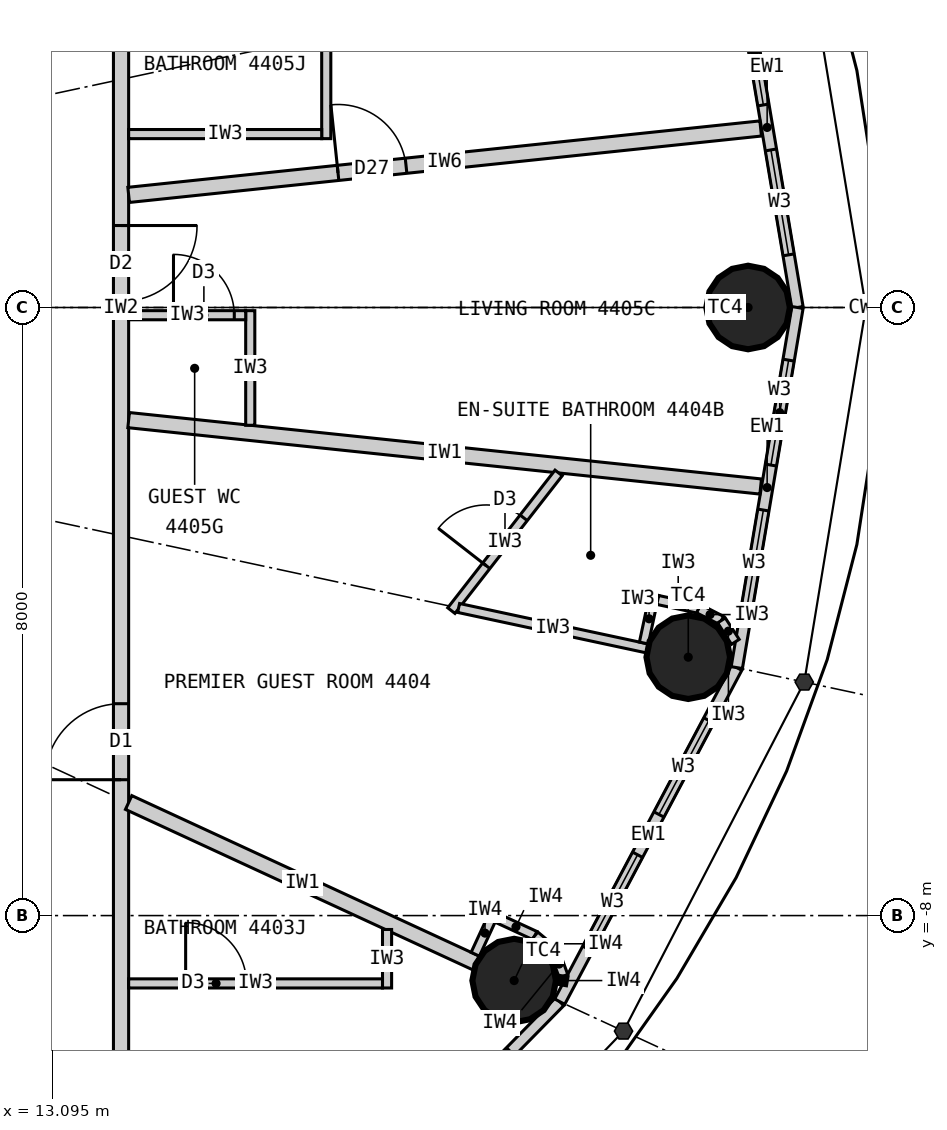
"""IFC4 building model, lengths in metres.
Left out: names, types, materials, properties, quantities, classifications, styles, units other than length and angle.
Written with IfcOpenShell. Run it as: python <this file> out.ifc"""

import sys

from ifc_helpers import new_model, si_unit, direction, frame, frame_2d, origin, origin_2d, place, context, subcontext, project, spatial, rectangle, circle, extrude, element, fill, save


model = new_model("IFC4")
c1 = context("Model", 3, precision=1e-05, world=origin(), true_north=direction((0.0, 1.0)))
c2 = subcontext(c1, "Body", "Model", "MODEL_VIEW")
j1 = project(units=[si_unit("LENGTHUNIT", "METRE"), si_unit("PLANEANGLEUNIT", "RADIAN")], contexts=[c1])
p1 = place(None, origin())
s1 = spatial("IfcSite", under=j1, at=p1, CompositionType="ELEMENT")
p2 = place(p1, origin())
s2 = spatial("IfcBuilding", under=s1, at=p2, CompositionType="ELEMENT")
p3 = place(p2, frame((0.0, 0.0, 166.5)))
s3 = spatial("IfcBuildingStorey", under=s2, at=p3, CompositionType="ELEMENT", Elevation=166.5)
for number, where, z_axis, x_axis in (
    (1, (22.25, 0.0, 0.0), (0.0, 0.0, 1.0), (1.0, 0.0, 0.0)),
    (2, (19.172, -8.855, 0.0), (0.0, 0.0, 1.0), (1.0, 0.0, 0.0)),
    (3, (21.463, -4.601, 0.0), (0.0, 0.0, 1.0), (1.0, 0.0, 0.0)),
):
    element("IfcColumn", number, at=place(p3, frame(where, z_axis=z_axis, x_axis=x_axis)), inside=s3, PredefinedType="COLUMN", context=c2, shape_type="SweptSolid", body=[
        extrude(circle(Radius=0.55, at=origin_2d()), origin(), (0.0, 0.0, 1.0), 3.3),
    ])
p4 = place(p3, frame((22.9, 0.0, 0.0), z_axis=(0.0, 0.0, 1.0), x_axis=(-0.166162111254, 0.986098449843, 0.0)))
e4 = element("IfcWall", 4, at=p4, inside=s3, PredefinedType="ELEMENTEDWALL", context=c2, shape_type="SweptSolid", body=[
    extrude(rectangle(XDim=4.805, YDim=0.15, at=frame_2d((2.402, 0.0))), origin(), (0.0, 0.0, 1.0), 3.12),
])
p5 = place(p4, frame((0.702, 0.0, 0.9)))
e5 = element("IfcOpeningElement", 5, at=p5, cuts=e4, PredefinedType="OPENING", context=c2, shape_type="SweptSolid", body=[
    extrude(rectangle(XDim=1.4, YDim=1.9, at=frame_2d((0.7, 0.95))), frame((0.0, 0.085, 0.0), z_axis=(0.0, -1.0, 0.0), x_axis=(1.0, 0.0, 0.0)), (0.0, 0.0, 1.0), 0.17),
])
p6 = place(p4, frame((2.702, 0.0, 0.9)))
e6 = element("IfcOpeningElement", 6, at=p6, cuts=e4, PredefinedType="OPENING", context=c2, shape_type="SweptSolid", body=[
    extrude(rectangle(XDim=1.4, YDim=1.9, at=frame_2d((0.7, 0.95))), frame((0.0, 0.085, 0.0), z_axis=(0.0, -1.0, 0.0), x_axis=(1.0, 0.0, 0.0)), (0.0, 0.0, 1.0), 0.17),
])
p7 = place(p3, frame((16.095, -12.876, 0.0), z_axis=(0.0, 0.0, 1.0), x_axis=(0.700727467776, 0.71342905457, 0.0)))
e7 = element("IfcWall", 7, at=p7, inside=s3, PredefinedType="ELEMENTEDWALL", context=c2, shape_type="SweptSolid", body=[
    extrude(rectangle(XDim=5.247, YDim=0.15, at=frame_2d((2.624, 0.0))), origin(), (0.0, 0.0, 1.0), 3.12),
])
p8 = place(p7, frame((0.924, 0.0, 0.9)))
e8 = element("IfcOpeningElement", 8, at=p8, cuts=e7, PredefinedType="OPENING", context=c2, shape_type="SweptSolid", body=[
    extrude(rectangle(XDim=1.4, YDim=1.9, at=frame_2d((0.7, 0.95))), frame((0.0, 0.085, 0.0), z_axis=(0.0, -1.0, 0.0), x_axis=(1.0, 0.0, 0.0)), (0.0, 0.0, 1.0), 0.17),
])
p9 = place(p7, frame((2.924, 0.0, 0.9)))
e9 = element("IfcOpeningElement", 9, at=p9, cuts=e7, PredefinedType="OPENING", context=c2, shape_type="SweptSolid", body=[
    extrude(rectangle(XDim=1.4, YDim=1.9, at=frame_2d((0.7, 0.95))), frame((0.0, 0.085, 0.0), z_axis=(0.0, -1.0, 0.0), x_axis=(1.0, 0.0, 0.0)), (0.0, 0.0, 1.0), 0.17),
])
p10 = place(p3, frame((19.772, -9.132, 0.0), z_axis=(0.0, 0.0, 1.0), x_axis=(0.468428906714, 0.883501193748, 0.0)))
e10 = element("IfcWall", 10, at=p10, inside=s3, PredefinedType="ELEMENTEDWALL", context=c2, shape_type="SweptSolid", body=[
    extrude(rectangle(XDim=4.974, YDim=0.15, at=frame_2d((2.487, 0.0))), origin(), (0.0, 0.0, 1.0), 3.12),
])
p11 = place(p10, frame((0.787, 0.0, 0.9)))
e11 = element("IfcOpeningElement", 11, at=p11, cuts=e10, PredefinedType="OPENING", context=c2, shape_type="SweptSolid", body=[
    extrude(rectangle(XDim=1.4, YDim=1.9, at=frame_2d((0.7, 0.95))), frame((0.0, 0.085, 0.0), z_axis=(0.0, -1.0, 0.0), x_axis=(1.0, 0.0, 0.0)), (0.0, 0.0, 1.0), 0.17),
])
p12 = place(p10, frame((2.787, 0.0, 0.9)))
e12 = element("IfcOpeningElement", 12, at=p12, cuts=e10, PredefinedType="OPENING", context=c2, shape_type="SweptSolid", body=[
    extrude(rectangle(XDim=1.4, YDim=1.9, at=frame_2d((0.7, 0.95))), frame((0.0, 0.085, 0.0), z_axis=(0.0, -1.0, 0.0), x_axis=(1.0, 0.0, 0.0)), (0.0, 0.0, 1.0), 0.17),
])
p13 = place(p3, frame((22.102, -4.738, 0.0), z_axis=(0.0, 0.0, 1.0), x_axis=(0.166162111254, 0.986098449843, 0.0)))
e13 = element("IfcWall", 13, at=p13, inside=s3, PredefinedType="ELEMENTEDWALL", context=c2, shape_type="SweptSolid", body=[
    extrude(rectangle(XDim=4.805, YDim=0.15, at=frame_2d((2.402, 0.0))), origin(), (0.0, 0.0, 1.0), 3.12),
])
p14 = place(p13, frame((0.702, 0.0, 0.9)))
e14 = element("IfcOpeningElement", 14, at=p14, cuts=e13, PredefinedType="OPENING", context=c2, shape_type="SweptSolid", body=[
    extrude(rectangle(XDim=1.4, YDim=1.9, at=frame_2d((0.7, 0.95))), frame((0.0, 0.085, 0.0), z_axis=(0.0, -1.0, 0.0), x_axis=(1.0, 0.0, 0.0)), (0.0, 0.0, 1.0), 0.17),
])
p15 = place(p13, frame((2.702, 0.0, 0.9)))
e15 = element("IfcOpeningElement", 15, at=p15, cuts=e13, PredefinedType="OPENING", context=c2, shape_type="SweptSolid", body=[
    extrude(rectangle(XDim=1.4, YDim=1.9, at=frame_2d((0.7, 0.95))), frame((0.0, 0.085, 0.0), z_axis=(0.0, -1.0, 0.0), x_axis=(1.0, 0.0, 0.0)), (0.0, 0.0, 1.0), 0.17),
])
p16 = place(p3, frame((14.0, -9.9, 0.0), z_axis=(0.0, 0.0, 1.0), x_axis=(0.0, 1.0, 0.0)))
e16 = element("IfcWall", 16, at=p16, inside=s3, PredefinedType="PARTITIONING", context=c2, shape_type="SweptSolid", body=[
    extrude(rectangle(XDim=19.8, YDim=0.2, at=frame_2d((9.9, 0.0))), origin(), (0.0, 0.0, 1.0), 3.12),
])
p17 = place(p16, frame((3.688, 0.0, 0.0)))
e17 = element("IfcOpeningElement", 17, at=p17, cuts=e16, PredefinedType="OPENING", context=c2, shape_type="SweptSolid", body=[
    extrude(rectangle(XDim=1.0, YDim=2.2, at=frame_2d((0.5, 1.1))), frame((0.0, 0.11, 0.0), z_axis=(0.0, -1.0, 0.0), x_axis=(1.0, 0.0, 0.0)), (0.0, 0.0, 1.0), 0.22),
])
p18 = place(p16, frame((9.979, 0.0, 0.0)))
e18 = element("IfcOpeningElement", 18, at=p18, cuts=e16, PredefinedType="OPENING", context=c2, shape_type="SweptSolid", body=[
    extrude(rectangle(XDim=1.0, YDim=2.2, at=frame_2d((0.5, 1.1))), frame((0.0, 0.11, 0.0), z_axis=(0.0, -1.0, 0.0), x_axis=(1.0, 0.0, 0.0)), (0.0, 0.0, 1.0), 0.22),
])
p19 = place(p16, frame((17.122, 0.0, 0.0)))
e19 = element("IfcOpeningElement", 19, at=p19, cuts=e16, PredefinedType="OPENING", context=c2, shape_type="SweptSolid", body=[
    extrude(rectangle(XDim=1.0, YDim=2.2, at=frame_2d((0.5, 1.1))), frame((0.0, 0.11, 0.0), z_axis=(0.0, -1.0, 0.0), x_axis=(1.0, 0.0, 0.0)), (0.0, 0.0, 1.0), 0.22),
])
p20 = place(p3, frame((14.1, 1.481, 0.0), z_axis=(0.0, 0.0, 1.0), x_axis=(0.994524794819, 0.104500873159, 0.0)))
e20 = element("IfcWall", 20, at=p20, inside=s3, PredefinedType="PARTITIONING", context=c2, shape_type="SweptSolid", body=[
    extrude(rectangle(XDim=8.362, YDim=0.2, at=frame_2d((4.181, 0.0))), origin(), (0.0, 0.0, 1.0), 2.47),
])
p21 = place(p20, frame((2.77, 0.0, 0.0)))
e21 = element("IfcOpeningElement", 21, at=p21, cuts=e20, PredefinedType="OPENING", context=c2, shape_type="SweptSolid", body=[
    extrude(rectangle(XDim=0.9, YDim=2.1, at=frame_2d((0.45, 1.05))), frame((0.0, 0.11, 0.0), z_axis=(0.0, -1.0, 0.0), x_axis=(1.0, 0.0, 0.0)), (0.0, 0.0, 1.0), 0.22),
])
p22 = place(p3, frame((14.1, -6.512, 0.0), z_axis=(0.0, 0.0, 1.0), x_axis=(0.907823150669, -0.419353224751, 0.0)))
e22 = element("IfcWall", 22, at=p22, inside=s3, PredefinedType="PARTITIONING", context=c2, shape_type="SweptSolid", body=[
    extrude(rectangle(XDim=5.037, YDim=0.2, at=frame_2d((2.519, 0.0))), origin(), (0.0, 0.0, 1.0), 2.32),
])
p23 = place(p3, frame((14.1, -1.481, 0.0), z_axis=(0.0, 0.0, 1.0), x_axis=(0.994524794819, -0.104500873159, 0.0)))
e23 = element("IfcWall", 23, at=p23, inside=s3, PredefinedType="PARTITIONING", context=c2, shape_type="SweptSolid", body=[
    extrude(rectangle(XDim=8.362, YDim=0.2, at=frame_2d((4.181, 0.0))), origin(), (0.0, 0.0, 1.0), 2.47),
])
p24 = place(p3, frame((17.5, -8.183, 0.0), z_axis=(0.0, 0.0, 1.0), x_axis=(0.0, -1.0, 0.0)))
e24 = element("IfcWall", 24, at=p24, inside=s3, PredefinedType="PARTITIONING", context=c2, shape_type="SweptSolid", body=[
    extrude(rectangle(XDim=0.77, YDim=0.12, at=frame_2d((0.385, 0.0))), origin(), (0.0, 0.0, 1.0), 3.12),
])
p25 = place(p3, frame((14.1, -8.893, 0.0), z_axis=(0.0, 0.0, 1.0), x_axis=(1.0, 0.0, 0.0)))
e25 = element("IfcWall", 25, at=p25, inside=s3, PredefinedType="PARTITIONING", context=c2, shape_type="SweptSolid", body=[
    extrude(rectangle(XDim=3.34, YDim=0.12, at=frame_2d((1.67, 0.0))), origin(), (0.0, 0.0, 1.0), 3.12),
])
p26 = place(p25, frame((0.75, 0.0, 0.0)))
e26 = element("IfcOpeningElement", 26, at=p26, cuts=e25, PredefinedType="OPENING", context=c2, shape_type="SweptSolid", body=[
    extrude(rectangle(XDim=0.8, YDim=2.1, at=frame_2d((0.4, 1.05))), frame((0.0, 0.07, 0.0), z_axis=(0.0, -1.0, 0.0), x_axis=(1.0, 0.0, 0.0)), (0.0, 0.0, 1.0), 0.14),
])
p27 = place(p3, frame((19.758, -2.177, 0.0), z_axis=(0.0, 0.0, 1.0), x_axis=(-0.614713147302, -0.788750750576, 0.0)))
e27 = element("IfcWall", 27, at=p27, inside=s3, PredefinedType="PARTITIONING", context=c2, shape_type="SweptSolid", body=[
    extrude(rectangle(XDim=2.296, YDim=0.12, at=frame_2d((1.148, 0.0))), origin(), (0.0, 0.0, 1.0), 3.12),
])
p28 = place(p27, frame((0.748, 0.0, 0.0)))
e28 = element("IfcOpeningElement", 28, at=p28, cuts=e27, PredefinedType="OPENING", context=c2, shape_type="SweptSolid", body=[
    extrude(rectangle(XDim=0.8, YDim=2.1, at=frame_2d((0.4, 1.05))), frame((0.0, 0.07, 0.0), z_axis=(0.0, -1.0, 0.0), x_axis=(1.0, 0.0, 0.0)), (0.0, 0.0, 1.0), 0.14),
])
p29 = place(p3, frame((18.441, -3.953, 0.0), z_axis=(0.0, 0.0, 1.0), x_axis=(0.977801007461, -0.209535652833, 0.0)))
e29 = element("IfcWall", 29, at=p29, inside=s3, PredefinedType="PARTITIONING", context=c2, shape_type="SweptSolid", body=[
    extrude(rectangle(XDim=2.54, YDim=0.12, at=frame_2d((1.27, 0.0))), origin(), (0.0, 0.0, 1.0), 2.42),
])
p30 = place(p3, frame((20.879, -4.414, 0.0), z_axis=(0.0, 0.0, 1.0), x_axis=(0.209554644104, 0.977796937577, 0.0)))
e30 = element("IfcWall", 30, at=p30, inside=s3, PredefinedType="PARTITIONING", context=c2, shape_type="SweptSolid", body=[
    extrude(rectangle(XDim=0.652, YDim=0.12, at=frame_2d((0.326, 0.0))), origin(), (0.0, 0.0, 1.0), 3.12),
])
p31 = place(p3, frame((21.062, -3.848, 0.0), z_axis=(0.0, 0.0, 1.0), x_axis=(0.977789415726, -0.209589738521, 0.0)))
e31 = element("IfcWall", 31, at=p31, inside=s3, PredefinedType="PARTITIONING", context=c2, shape_type="SweptSolid", body=[
    extrude(rectangle(XDim=0.55, YDim=0.12, at=frame_2d((0.275, 0.0))), origin(), (0.0, 0.0, 1.0), 3.12),
])
p32 = place(p3, frame((21.599, -3.963, 0.0), z_axis=(0.0, 0.0, 1.0), x_axis=(0.890193602875, -0.455582428766, 0.0)))
e32 = element("IfcWall", 32, at=p32, inside=s3, PredefinedType="PARTITIONING", context=c2, shape_type="SweptSolid", body=[
    extrude(rectangle(XDim=0.338, YDim=0.12, at=frame_2d((0.169, 0.0))), origin(), (0.0, 0.0, 1.0), 3.12),
])
p33 = place(p3, frame((21.9, -4.117, 0.0), z_axis=(0.0, 0.0, 1.0), x_axis=(0.543582688681, -0.839355622228, 0.0)))
e33 = element("IfcWall", 33, at=p33, inside=s3, PredefinedType="PARTITIONING", context=c2, shape_type="SweptSolid", body=[
    extrude(rectangle(XDim=0.336, YDim=0.12, at=frame_2d((0.168, 0.0))), origin(), (0.0, 0.0, 1.0), 3.12),
])
p34 = place(p3, frame((15.7, -1.55, 0.0), z_axis=(0.0, 0.0, 1.0), x_axis=(0.0, 1.0, 0.0)))
e34 = element("IfcWall", 34, at=p34, inside=s3, PredefinedType="PARTITIONING", context=c2, shape_type="SweptSolid", body=[
    extrude(rectangle(XDim=1.508, YDim=0.12, at=frame_2d((0.754, 0.0))), origin(), (0.0, 0.0, 1.0), 3.12),
])
p35 = place(p3, frame((14.1, -0.102, 0.0), z_axis=(0.0, 0.0, 1.0), x_axis=(1.0, 0.0, 0.0)))
e35 = element("IfcWall", 35, at=p35, inside=s3, PredefinedType="PARTITIONING", context=c2, shape_type="SweptSolid", body=[
    extrude(rectangle(XDim=1.54, YDim=0.12, at=frame_2d((0.77, 0.0))), origin(), (0.0, 0.0, 1.0), 2.42),
])
p36 = place(p35, frame((0.59, 0.0, 0.0)))
e36 = element("IfcOpeningElement", 36, at=p36, cuts=e35, PredefinedType="OPENING", context=c2, shape_type="SweptSolid", body=[
    extrude(rectangle(XDim=0.8, YDim=2.1, at=frame_2d((0.4, 1.05))), frame((0.0, 0.07, 0.0), z_axis=(0.0, -1.0, 0.0), x_axis=(1.0, 0.0, 0.0)), (0.0, 0.0, 1.0), 0.14),
])
p37 = place(p3, frame((16.7, 5.421, 0.0), z_axis=(0.0, 0.0, 1.0), x_axis=(0.0, -1.0, 0.0)))
e37 = element("IfcWall", 37, at=p37, inside=s3, PredefinedType="PARTITIONING", context=c2, shape_type="SweptSolid", body=[
    extrude(rectangle(XDim=3.2, YDim=0.12, at=frame_2d((1.6, 0.0))), origin(), (0.0, 0.0, 1.0), 3.12),
])
p38 = place(p37, frame((1.2, 0.0, 0.0)))
e38 = element("IfcOpeningElement", 38, at=p38, cuts=e37, PredefinedType="OPENING", context=c2, shape_type="SweptSolid", body=[
    extrude(rectangle(XDim=0.8, YDim=2.1, at=frame_2d((0.4, 1.05))), frame((0.0, 0.07, 0.0), z_axis=(0.0, -1.0, 0.0), x_axis=(1.0, 0.0, 0.0)), (0.0, 0.0, 1.0), 0.14),
])
p39 = place(p3, frame((14.1, 2.281, 0.0), z_axis=(0.0, 0.0, 1.0), x_axis=(1.0, 0.0, 0.0)))
e39 = element("IfcWall", 39, at=p39, inside=s3, PredefinedType="PARTITIONING", context=c2, shape_type="SweptSolid", body=[
    extrude(rectangle(XDim=2.54, YDim=0.12, at=frame_2d((1.27, 0.0))), origin(), (0.0, 0.0, 1.0), 3.12),
])
p40 = place(p3, frame((18.66, -8.509, 0.0), z_axis=(0.0, 0.0, 1.0), x_axis=(0.419083463716, 0.907947713494, 0.0)))
e40 = element("IfcWall", 40, at=p40, inside=s3, PredefinedType="PARTITIONING", context=c2, shape_type="SweptSolid", body=[
    extrude(rectangle(XDim=0.612, YDim=0.12, at=frame_2d((0.306, 0.0))), origin(), (0.0, 0.0, 1.0), 3.12),
])
p41 = place(p3, frame((18.946, -8.032, 0.0), z_axis=(0.0, 0.0, 1.0), x_axis=(0.907842467956, -0.419311403822, 0.0)))
e41 = element("IfcWall", 41, at=p41, inside=s3, PredefinedType="PARTITIONING", context=c2, shape_type="SweptSolid", body=[
    extrude(rectangle(XDim=0.55, YDim=0.12, at=frame_2d((0.275, 0.0))), origin(), (0.0, 0.0, 1.0), 3.12),
])
p42 = place(p3, frame((19.446, -8.263, 0.0), z_axis=(0.0, 0.0, 1.0), x_axis=(0.768221279597, -0.640184399664, 0.0)))
e42 = element("IfcWall", 42, at=p42, inside=s3, PredefinedType="PARTITIONING", context=c2, shape_type="SweptSolid", body=[
    extrude(rectangle(XDim=0.337, YDim=0.12, at=frame_2d((0.169, 0.0))), origin(), (0.0, 0.0, 1.0), 3.12),
])
p43 = place(p3, frame((19.705, -8.479, 0.0), z_axis=(0.0, 0.0, 1.0), x_axis=(0.345571344575, -0.938392479621, 0.0)))
e43 = element("IfcWall", 43, at=p43, inside=s3, PredefinedType="PARTITIONING", context=c2, shape_type="SweptSolid", body=[
    extrude(rectangle(XDim=0.338, YDim=0.12, at=frame_2d((0.169, 0.0))), origin(), (0.0, 0.0, 1.0), 3.12),
])
p44 = place(p3, frame((19.822, -8.796, 0.0), z_axis=(0.0, 0.0, 1.0), x_axis=(-0.169701508781, -0.985495508827, 0.0)))
e44 = element("IfcWall", 44, at=p44, inside=s3, PredefinedType="PARTITIONING", context=c2, shape_type="SweptSolid", body=[
    extrude(rectangle(XDim=0.119, YDim=0.12, at=frame_2d((0.06, 0.0))), origin(), (0.0, 0.0, 1.0), 3.12),
])
p45 = place(p5, origin())
e45 = element("IfcWindow", 45, at=p45, inside=s3, PartitioningType="SINGLE_PANEL", PredefinedType="WINDOW", context=c2, shape_type="SweptSolid", body=[
    extrude(rectangle(XDim=1.4, YDim=1.9, at=frame_2d((0.7, 0.95))), frame((0.0, 0.03, 0.0), z_axis=(0.0, -1.0, 0.0), x_axis=(1.0, 0.0, 0.0)), (0.0, 0.0, 1.0), 0.06),
])
fill(e5, e45)
p46 = place(p6, origin())
e46 = element("IfcWindow", 46, at=p46, inside=s3, PartitioningType="SINGLE_PANEL", PredefinedType="WINDOW", context=c2, shape_type="SweptSolid", body=[
    extrude(rectangle(XDim=1.4, YDim=1.9, at=frame_2d((0.7, 0.95))), frame((0.0, 0.03, 0.0), z_axis=(0.0, -1.0, 0.0), x_axis=(1.0, 0.0, 0.0)), (0.0, 0.0, 1.0), 0.06),
])
fill(e6, e46)
p47 = place(p11, origin())
e47 = element("IfcWindow", 47, at=p47, inside=s3, PartitioningType="SINGLE_PANEL", PredefinedType="WINDOW", context=c2, shape_type="SweptSolid", body=[
    extrude(rectangle(XDim=1.4, YDim=1.9, at=frame_2d((0.7, 0.95))), frame((0.0, 0.03, 0.0), z_axis=(0.0, -1.0, 0.0), x_axis=(1.0, 0.0, 0.0)), (0.0, 0.0, 1.0), 0.06),
])
fill(e11, e47)
p48 = place(p12, origin())
e48 = element("IfcWindow", 48, at=p48, inside=s3, PartitioningType="SINGLE_PANEL", PredefinedType="WINDOW", context=c2, shape_type="SweptSolid", body=[
    extrude(rectangle(XDim=1.4, YDim=1.9, at=frame_2d((0.7, 0.95))), frame((0.0, 0.03, 0.0), z_axis=(0.0, -1.0, 0.0), x_axis=(1.0, 0.0, 0.0)), (0.0, 0.0, 1.0), 0.06),
])
fill(e12, e48)
p49 = place(p14, origin())
e49 = element("IfcWindow", 49, at=p49, inside=s3, PartitioningType="SINGLE_PANEL", PredefinedType="WINDOW", context=c2, shape_type="SweptSolid", body=[
    extrude(rectangle(XDim=1.4, YDim=1.9, at=frame_2d((0.7, 0.95))), frame((0.0, 0.03, 0.0), z_axis=(0.0, -1.0, 0.0), x_axis=(1.0, 0.0, 0.0)), (0.0, 0.0, 1.0), 0.06),
])
fill(e14, e49)
p50 = place(p15, origin())
e50 = element("IfcWindow", 50, at=p50, inside=s3, PartitioningType="SINGLE_PANEL", PredefinedType="WINDOW", context=c2, shape_type="SweptSolid", body=[
    extrude(rectangle(XDim=1.4, YDim=1.9, at=frame_2d((0.7, 0.95))), frame((0.0, 0.03, 0.0), z_axis=(0.0, -1.0, 0.0), x_axis=(1.0, 0.0, 0.0)), (0.0, 0.0, 1.0), 0.06),
])
fill(e15, e50)
p51 = place(p26, origin())
e51 = element("IfcDoor", 51, at=p51, inside=s3, OperationType="SINGLE_SWING_LEFT", PredefinedType="DOOR", context=c2, shape_type="SweptSolid", body=[
    extrude(rectangle(XDim=0.8, YDim=2.1, at=frame_2d((0.4, 1.05))), frame((0.0, 0.025, 0.0), z_axis=(0.0, -1.0, 0.0), x_axis=(1.0, 0.0, 0.0)), (0.0, 0.0, 1.0), 0.05),
])
fill(e26, e51)
p52 = place(p28, origin())
e52 = element("IfcDoor", 52, at=p52, inside=s3, OperationType="SINGLE_SWING_RIGHT", PredefinedType="DOOR", context=c2, shape_type="SweptSolid", body=[
    extrude(rectangle(XDim=0.8, YDim=2.1, at=frame_2d((0.4, 1.05))), frame((0.0, 0.025, 0.0), z_axis=(0.0, -1.0, 0.0), x_axis=(1.0, 0.0, 0.0)), (0.0, 0.0, 1.0), 0.05),
])
fill(e28, e52)
p53 = place(p17, origin())
e53 = element("IfcDoor", 53, at=p53, inside=s3, OperationType="SINGLE_SWING_LEFT", PredefinedType="DOOR", context=c2, shape_type="SweptSolid", body=[
    extrude(rectangle(XDim=1.0, YDim=2.2, at=frame_2d((0.5, 1.1))), frame((0.0, 0.025, 0.0), z_axis=(0.0, -1.0, 0.0), x_axis=(1.0, 0.0, 0.0)), (0.0, 0.0, 1.0), 0.05),
])
fill(e17, e53)
p54 = place(p36, origin())
e54 = element("IfcDoor", 54, at=p54, inside=s3, OperationType="SINGLE_SWING_LEFT", PredefinedType="DOOR", context=c2, shape_type="SweptSolid", body=[
    extrude(rectangle(XDim=0.8, YDim=2.1, at=frame_2d((0.4, 1.05))), frame((0.0, 0.025, 0.0), z_axis=(0.0, -1.0, 0.0), x_axis=(1.0, 0.0, 0.0)), (0.0, 0.0, 1.0), 0.05),
])
fill(e36, e54)
p55 = place(p18, origin())
e55 = element("IfcDoor", 55, at=p55, inside=s3, OperationType="SINGLE_SWING_RIGHT", PredefinedType="DOOR", context=c2, shape_type="SweptSolid", body=[
    extrude(rectangle(XDim=1.0, YDim=2.2, at=frame_2d((0.5, 1.1))), frame((0.0, 0.025, 0.0), z_axis=(0.0, -1.0, 0.0), x_axis=(1.0, 0.0, 0.0)), (0.0, 0.0, 1.0), 0.05),
])
fill(e18, e55)
p56 = place(p21, origin())
e56 = element("IfcDoor", 56, at=p56, inside=s3, OperationType="SINGLE_SWING_LEFT", PredefinedType="DOOR", context=c2, shape_type="SweptSolid", body=[
    extrude(rectangle(XDim=0.9, YDim=2.1, at=frame_2d((0.45, 1.05))), frame((0.0, 0.025, 0.0), z_axis=(0.0, -1.0, 0.0), x_axis=(1.0, 0.0, 0.0)), (0.0, 0.0, 1.0), 0.05),
])
fill(e21, e56)
save(model, sys.argv[1])
